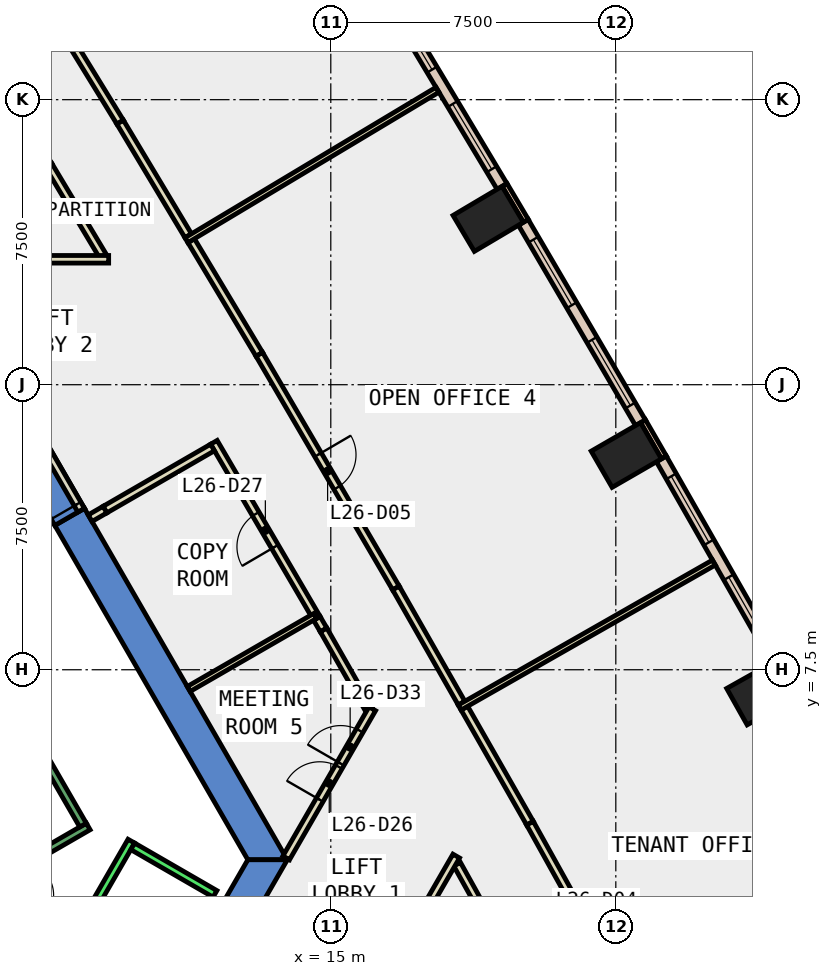
"""IFC4 building model, lengths in metres.
Left out: names, types, materials, properties, quantities, classifications, styles, units other than length and angle.
Written with IfcOpenShell. Run it as: python <this file> out.ifc"""

import sys

from ifc_helpers import new_model, si_unit, direction, frame, frame_2d, origin, origin_2d, place, context, subcontext, project, spatial, polyline, rectangle, outline, extrude, element, fill, save


model = new_model("IFC4")
c1 = context("Model", 3, precision=1e-05, world=origin(), true_north=direction((0.0, 1.0)))
c2 = subcontext(c1, "Body", "Model", "MODEL_VIEW")
j1 = project(units=[si_unit("LENGTHUNIT", "METRE"), si_unit("PLANEANGLEUNIT", "RADIAN")], contexts=[c1])
p1 = place(None, origin())
s1 = spatial("IfcSite", under=j1, at=p1, CompositionType="ELEMENT")
p2 = place(p1, origin())
s2 = spatial("IfcBuilding", under=s1, at=p2, CompositionType="ELEMENT")
p3 = place(p2, frame((0.0, 0.0, 120.2)))
s3 = spatial("IfcBuildingStorey", under=s2, at=p3, CompositionType="ELEMENT", Elevation=120.2)
for number, where, z_axis, x_axis in (
    (1, (26.341, 6.896, -0.4), (0.0, 0.0, 1.0), (-0.49, 0.872, 0.0)),
    (2, (22.777, 13.15, -0.4), (0.0, 0.0, 1.0), (-0.5, 0.866, 0.0)),
    (3, (19.143, 19.364, -0.4), (0.0, 0.0, 1.0), (-0.51, 0.86, 0.0)),
):
    element("IfcColumn", number, at=place(p3, frame(where, z_axis=z_axis, x_axis=x_axis)), inside=s3, PredefinedType="COLUMN", context=c2, shape_type="SweptSolid", body=[
        extrude(rectangle(XDim=1.1, YDim=1.5, at=origin_2d()), origin(), (0.0, 0.0, 1.0), 4.2),
    ])
p4 = place(p3, frame((0.0, 0.0, -0.4)))
e4 = element("IfcWall", 4, at=p4, inside=s3, PredefinedType="SHEAR", context=c2, shape_type="SweptSolid", body=[
    extrude(outline(polyline([(8.517, 11.748), (7.738, 11.298), (12.817, 2.5), (13.856, 2.5), (8.517, 11.748)])), origin(), (0.0, 0.0, 1.0), 4.2),
])
p5 = place(p3, frame((0.0, 0.0, 3.6)))
e5 = element("IfcWall", 5, at=p5, inside=s3, PredefinedType="SHEAR", context=c2, shape_type="SweptSolid", body=[
    extrude(outline(polyline([(7.517, 13.48), (6.738, 13.03), (7.738, 11.298), (8.517, 11.748), (7.517, 13.48)])), origin(), (0.0, 0.0, 1.0), 0.2),
])
p6 = place(p3, frame((0.0, 0.0, -0.4)))
e6 = element("IfcWall", 6, at=p6, inside=s3, PredefinedType="SHEAR", context=c2, shape_type="SweptSolid", body=[
    extrude(outline(polyline([(11.888, 0.89), (12.667, 0.44), (13.856, 2.5), (12.817, 2.5), (11.888, 0.89)])), origin(), (0.0, 0.0, 1.0), 4.2),
])
p7 = place(p3, frame((23.766, 13.086, 0.0), z_axis=(0.0, 0.0, 1.0), x_axis=(-0.499837685251, 0.86611909597, 0.0)))
e7 = element("IfcWall", 7, at=p7, inside=s3, PredefinedType="STANDARD", context=c2, shape_type="SweptSolid", body=[
    extrude(rectangle(XDim=1.1, YDim=0.15, at=frame_2d((0.55, 0.0))), origin(), (0.0, 0.0, 1.0), 3.8),
])
p8 = place(p3, frame((20.133, 19.312, 0.0), z_axis=(0.0, 0.0, 1.0), x_axis=(-0.510082245696, 0.860125631885, 0.0)))
e8 = element("IfcWall", 8, at=p8, inside=s3, PredefinedType="STANDARD", context=c2, shape_type="SweptSolid", body=[
    extrude(rectangle(XDim=1.1, YDim=0.15, at=frame_2d((0.55, 0.0))), origin(), (0.0, 0.0, 1.0), 3.8),
])
p9 = place(p3, frame((26.723, 7.74, 0.0), z_axis=(0.0, 0.0, 1.0), x_axis=(-0.495114366991, 0.868827810098, 0.0)))
e9 = element("IfcWall", 9, at=p9, inside=s3, PredefinedType="STANDARD", context=c2, shape_type="SweptSolid", body=[
    extrude(rectangle(XDim=6.11, YDim=0.3, at=frame_2d((3.055, 0.0))), origin(), (0.0, 0.0, 1.0), 3.8),
])
p10 = place(p9, frame((0.527, 0.0, 0.9)))
e10 = element("IfcOpeningElement", 10, at=p10, cuts=e9, PredefinedType="OPENING", context=c2, shape_type="SweptSolid", body=[
    extrude(rectangle(XDim=2.0, YDim=2.6, at=frame_2d((1.0, 1.3))), frame((0.0, 0.16, 0.0), z_axis=(0.0, -1.0, 0.0), x_axis=(1.0, 0.0, 0.0)), (0.0, 0.0, 1.0), 0.32),
])
p11 = place(p9, frame((3.582, 0.0, 0.9)))
e11 = element("IfcOpeningElement", 11, at=p11, cuts=e9, PredefinedType="OPENING", context=c2, shape_type="SweptSolid", body=[
    extrude(rectangle(XDim=2.0, YDim=2.6, at=frame_2d((1.0, 1.3))), frame((0.0, 0.16, 0.0), z_axis=(0.0, -1.0, 0.0), x_axis=(1.0, 0.0, 0.0)), (0.0, 0.0, 1.0), 0.32),
])
p12 = place(p3, frame((23.149, 13.999, 0.0), z_axis=(0.0, 0.0, 1.0), x_axis=(-0.504790055126, 0.863242144619, 0.0)))
e12 = element("IfcWall", 12, at=p12, inside=s3, PredefinedType="STANDARD", context=c2, shape_type="SweptSolid", body=[
    extrude(rectangle(XDim=6.109, YDim=0.3, at=frame_2d((3.055, 0.0))), origin(), (0.0, 0.0, 1.0), 3.8),
])
p13 = place(p12, frame((0.527, 0.0, 0.9)))
e13 = element("IfcOpeningElement", 13, at=p13, cuts=e12, PredefinedType="OPENING", context=c2, shape_type="SweptSolid", body=[
    extrude(rectangle(XDim=2.0, YDim=2.6, at=frame_2d((1.0, 1.3))), frame((0.0, 0.16, 0.0), z_axis=(0.0, -1.0, 0.0), x_axis=(1.0, 0.0, 0.0)), (0.0, 0.0, 1.0), 0.32),
])
p14 = place(p12, frame((3.582, 0.0, 0.9)))
e14 = element("IfcOpeningElement", 14, at=p14, cuts=e12, PredefinedType="OPENING", context=c2, shape_type="SweptSolid", body=[
    extrude(rectangle(XDim=2.0, YDim=2.6, at=frame_2d((1.0, 1.3))), frame((0.0, 0.16, 0.0), z_axis=(0.0, -1.0, 0.0), x_axis=(1.0, 0.0, 0.0)), (0.0, 0.0, 1.0), 0.32),
])
p15 = place(p3, frame((19.506, 20.217, 0.0), z_axis=(0.0, 0.0, 1.0), x_axis=(-0.514078503149, 0.857743139057, 0.0)))
e15 = element("IfcWall", 15, at=p15, inside=s3, PredefinedType="STANDARD", context=c2, shape_type="SweptSolid", body=[
    extrude(rectangle(XDim=6.11, YDim=0.3, at=frame_2d((3.055, 0.0))), origin(), (0.0, 0.0, 1.0), 3.8),
])
p16 = place(p15, frame((0.528, 0.0, 0.9)))
e16 = element("IfcOpeningElement", 16, at=p16, cuts=e15, PredefinedType="OPENING", context=c2, shape_type="SweptSolid", body=[
    extrude(rectangle(XDim=2.0, YDim=2.6, at=frame_2d((1.0, 1.3))), frame((0.0, 0.16, 0.0), z_axis=(0.0, -1.0, 0.0), x_axis=(1.0, 0.0, 0.0)), (0.0, 0.0, 1.0), 0.32),
])
p17 = place(p15, frame((3.583, 0.0, 0.9)))
e17 = element("IfcOpeningElement", 17, at=p17, cuts=e15, PredefinedType="OPENING", context=c2, shape_type="SweptSolid", body=[
    extrude(rectangle(XDim=2.0, YDim=2.6, at=frame_2d((1.0, 1.3))), frame((0.0, 0.16, 0.0), z_axis=(0.0, -1.0, 0.0), x_axis=(1.0, 0.0, 0.0)), (0.0, 0.0, 1.0), 0.32),
])
p18 = place(p3, frame((15.993, 6.473, 0.0), z_axis=(0.0, 0.0, 1.0), x_axis=(-0.495159881733, 0.86880187127, 0.0)))
e18 = element("IfcWall", 18, at=p18, inside=s3, PredefinedType="PARTITIONING", context=c2, shape_type="SweptSolid", body=[
    extrude(rectangle(XDim=2.391, YDim=0.2, at=frame_2d((1.195, 0.0))), origin(), (0.0, 0.0, 1.0), 3.8),
])
p19 = place(p3, frame((14.809, 8.55, 0.0), z_axis=(0.0, 0.0, 1.0), x_axis=(-0.50443330283, 0.86345066043, 0.0)))
e19 = element("IfcWall", 19, at=p19, inside=s3, PredefinedType="PARTITIONING", context=c2, shape_type="SweptSolid", body=[
    extrude(rectangle(XDim=0.351, YDim=0.2, at=frame_2d((0.175, 0.0))), origin(), (0.0, 0.0, 1.0), 3.8),
])
p20 = place(p3, frame((14.632, 8.853, 0.0), z_axis=(0.0, 0.0, 1.0), x_axis=(-0.504798859257, 0.863236996249, 0.0)))
e20 = element("IfcWall", 20, at=p20, inside=s3, PredefinedType="PARTITIONING", context=c2, shape_type="SweptSolid", body=[
    extrude(rectangle(XDim=5.365, YDim=0.2, at=frame_2d((2.682, 0.0))), origin(), (0.0, 0.0, 1.0), 3.8),
])
p21 = place(p20, frame((2.182, 0.0, 0.0)))
e21 = element("IfcOpeningElement", 21, at=p21, cuts=e20, PredefinedType="OPENING", context=c2, shape_type="SweptSolid", body=[
    extrude(rectangle(XDim=1.0, YDim=2.1, at=frame_2d((0.5, 1.05))), frame((0.0, 0.11, 0.0), z_axis=(0.0, -1.0, 0.0), x_axis=(1.0, 0.0, 0.0)), (0.0, 0.0, 1.0), 0.22),
])
p22 = place(p3, frame((11.888, 13.348, 0.0), z_axis=(0.0, 0.0, 1.0), x_axis=(-0.865959227195, -0.500114603702, 0.0)))
e22 = element("IfcWall", 22, at=p22, inside=s3, PredefinedType="PARTITIONING", context=c2, shape_type="SweptSolid", body=[
    extrude(rectangle(XDim=3.269, YDim=0.2, at=frame_2d((1.635, 0.0))), origin(), (0.0, 0.0, 1.0), 3.8),
])
p23 = place(p3, frame((9.003, 18.386, 0.0), z_axis=(0.0, 0.0, 1.0), x_axis=(-0.513900868925, 0.857849577092, 0.0)))
e23 = element("IfcWall", 23, at=p23, inside=s3, PredefinedType="PARTITIONING", context=c2, shape_type="SweptSolid", body=[
    extrude(rectangle(XDim=2.777, YDim=0.2, at=frame_2d((1.388, 0.0))), origin(), (0.0, 0.0, 1.0), 3.8),
])
p24 = place(p3, frame((21.773, -3.822, 0.0), z_axis=(0.0, 0.0, 1.0), x_axis=(-0.485826874234, 0.874055060206, 0.0)))
e24 = element("IfcWall", 24, at=p24, inside=s3, PredefinedType="PARTITIONING", context=c2, shape_type="SweptSolid", body=[
    extrude(rectangle(XDim=7.099, YDim=0.2, at=frame_2d((3.55, 0.0))), origin(), (0.0, 0.0, 1.0), 3.8),
])
p25 = place(p3, frame((18.515, 6.491, 0.0), z_axis=(0.0, 0.0, 1.0), x_axis=(0.495309264725, -0.868716715781, 0.0)))
e25 = element("IfcWall", 25, at=p25, inside=s3, PredefinedType="PARTITIONING", context=c2, shape_type="SweptSolid", body=[
    extrude(rectangle(XDim=3.487, YDim=0.2, at=frame_2d((1.743, 0.0))), origin(), (0.0, 0.0, 1.0), 3.8),
])
p26 = place(p3, frame((20.242, 3.462, 0.0), z_axis=(0.0, 0.0, 1.0), x_axis=(0.485742937917, -0.874101709336, 0.0)))
e26 = element("IfcWall", 26, at=p26, inside=s3, PredefinedType="PARTITIONING", context=c2, shape_type="SweptSolid", body=[
    extrude(rectangle(XDim=7.047, YDim=0.2, at=frame_2d((3.523, 0.0))), origin(), (0.0, 0.0, 1.0), 3.8),
])
p27 = place(p26, frame((3.099, 0.0, 0.0)))
e27 = element("IfcOpeningElement", 27, at=p27, cuts=e26, PredefinedType="OPENING", context=c2, shape_type="SweptSolid", body=[
    extrude(rectangle(XDim=1.0, YDim=2.1, at=frame_2d((0.5, 1.05))), frame((0.0, 0.11, 0.0), z_axis=(0.0, -1.0, 0.0), x_axis=(1.0, 0.0, 0.0)), (0.0, 0.0, 1.0), 0.22),
])
p28 = place(p3, frame((11.326, 18.79, 0.0), z_axis=(0.0, 0.0, 1.0), x_axis=(0.514155958966, -0.857696712049, 0.0)))
e28 = element("IfcWall", 28, at=p28, inside=s3, PredefinedType="PARTITIONING", context=c2, shape_type="SweptSolid", body=[
    extrude(rectangle(XDim=3.487, YDim=0.2, at=frame_2d((1.744, 0.0))), origin(), (0.0, 0.0, 1.0), 3.8),
])
p29 = place(p3, frame((13.119, 15.799, 0.0), z_axis=(0.0, 0.0, 1.0), x_axis=(0.504729598075, -0.863277494684, 0.0)))
e29 = element("IfcWall", 29, at=p29, inside=s3, PredefinedType="PARTITIONING", context=c2, shape_type="SweptSolid", body=[
    extrude(rectangle(XDim=7.123, YDim=0.2, at=frame_2d((3.562, 0.0))), origin(), (0.0, 0.0, 1.0), 3.8),
])
p30 = place(p29, frame((3.061, 0.0, 0.0)))
e30 = element("IfcOpeningElement", 30, at=p30, cuts=e29, PredefinedType="OPENING", context=c2, shape_type="SweptSolid", body=[
    extrude(rectangle(XDim=1.0, YDim=2.1, at=frame_2d((0.5, 1.05))), frame((0.0, 0.11, 0.0), z_axis=(0.0, -1.0, 0.0), x_axis=(1.0, 0.0, 0.0)), (0.0, 0.0, 1.0), 0.22),
])
p31 = place(p3, frame((16.714, 9.65, 0.0), z_axis=(0.0, 0.0, 1.0), x_axis=(0.495286549488, -0.868729666753, 0.0)))
e31 = element("IfcWall", 31, at=p31, inside=s3, PredefinedType="PARTITIONING", context=c2, shape_type="SweptSolid", body=[
    extrude(rectangle(XDim=3.487, YDim=0.2, at=frame_2d((1.743, 0.0))), origin(), (0.0, 0.0, 1.0), 3.8),
])
p32 = place(p3, frame((5.69, 28.042, 0.0), z_axis=(0.0, 0.0, 1.0), x_axis=(0.523381868706, -0.852098245222, 0.0)))
e32 = element("IfcWall", 32, at=p32, inside=s3, PredefinedType="PARTITIONING", context=c2, shape_type="SweptSolid", body=[
    extrude(rectangle(XDim=7.198, YDim=0.2, at=frame_2d((3.599, 0.0))), origin(), (0.0, 0.0, 1.0), 3.8),
])
p33 = place(p32, frame((3.099, 0.0, 0.0)))
e33 = element("IfcOpeningElement", 33, at=p33, cuts=e32, PredefinedType="OPENING", context=c2, shape_type="SweptSolid", body=[
    extrude(rectangle(XDim=1.0, YDim=2.1, at=frame_2d((0.5, 1.05))), frame((0.0, 0.11, 0.0), z_axis=(0.0, -1.0, 0.0), x_axis=(1.0, 0.0, 0.0)), (0.0, 0.0, 1.0), 0.22),
])
p34 = place(p3, frame((9.457, 21.909, 0.0), z_axis=(0.0, 0.0, 1.0), x_axis=(0.513949903813, -0.857820200491, 0.0)))
e34 = element("IfcWall", 34, at=p34, inside=s3, PredefinedType="PARTITIONING", context=c2, shape_type="SweptSolid", body=[
    extrude(rectangle(XDim=3.487, YDim=0.2, at=frame_2d((1.743, 0.0))), origin(), (0.0, 0.0, 1.0), 3.8),
])
p35 = place(p3, frame((6.25, 1.894, 0.0), z_axis=(0.0, 0.0, 1.0), x_axis=(0.866043184279, -0.499969202016, 0.0)))
e35 = element("IfcWall", 35, at=p35, inside=s3, PredefinedType="PARTITIONING", context=c2, shape_type="SweptSolid", body=[
    extrude(rectangle(XDim=2.084, YDim=0.2, at=frame_2d((1.042, 0.0))), origin(), (0.0, 0.0, 1.0), 3.8),
])
p36 = place(p35, frame((0.642, 0.0, 0.0)))
e36 = element("IfcOpeningElement", 36, at=p36, cuts=e35, PredefinedType="OPENING", context=c2, shape_type="SweptSolid", body=[
    extrude(rectangle(XDim=0.9, YDim=2.1, at=frame_2d((0.45, 1.05))), frame((0.0, 0.11, 0.0), z_axis=(0.0, -1.0, 0.0), x_axis=(1.0, 0.0, 0.0)), (0.0, 0.0, 1.0), 0.22),
])
p37 = place(p3, frame((11.261, 6.994, 0.0), z_axis=(0.0, 0.0, 1.0), x_axis=(0.86605248387, 0.499953092981, 0.0)))
e37 = element("IfcWall", 37, at=p37, inside=s3, PredefinedType="PARTITIONING", context=c2, shape_type="SweptSolid", body=[
    extrude(rectangle(XDim=3.848, YDim=0.15, at=frame_2d((1.924, 0.0))), origin(), (0.0, 0.0, 1.0), 3.8),
])
p38 = place(p3, frame((13.827, 2.55, 0.0), z_axis=(0.0, 0.0, 1.0), x_axis=(0.500045913515, 0.865998893981, 0.0)))
e38 = element("IfcWall", 38, at=p38, inside=s3, PredefinedType="PARTITIONING", context=c2, shape_type="SweptSolid", body=[
    extrude(rectangle(XDim=4.53, YDim=0.2, at=frame_2d((2.265, 0.0))), origin(), (0.0, 0.0, 1.0), 3.8),
])
p39 = place(p38, frame((1.765, 0.0, 0.0)))
e39 = element("IfcOpeningElement", 39, at=p39, cuts=e38, PredefinedType="OPENING", context=c2, shape_type="SweptSolid", body=[
    extrude(rectangle(XDim=1.0, YDim=2.1, at=frame_2d((0.5, 1.05))), frame((0.0, 0.11, 0.0), z_axis=(0.0, -1.0, 0.0), x_axis=(1.0, 0.0, 0.0)), (0.0, 0.0, 1.0), 0.22),
])
p40 = place(p38, frame((2.865, 0.0, 0.0)))
e40 = element("IfcOpeningElement", 40, at=p40, cuts=e38, PredefinedType="OPENING", context=c2, shape_type="SweptSolid", body=[
    extrude(rectangle(XDim=1.0, YDim=2.1, at=frame_2d((0.5, 1.05))), frame((0.0, 0.11, 0.0), z_axis=(0.0, -1.0, 0.0), x_axis=(1.0, 0.0, 0.0)), (0.0, 0.0, 1.0), 0.22),
])
p41 = place(p3, frame((0.4, 18.3, 0.0), z_axis=(0.0, 0.0, 1.0), x_axis=(1.0, 0.0, 0.0)))
e41 = element("IfcWall", 41, at=p41, inside=s3, PredefinedType="PARTITIONING", context=c2, shape_type="SweptSolid", body=[
    extrude(rectangle(XDim=8.755, YDim=0.2, at=frame_2d((4.377, 0.0))), origin(), (0.0, 0.0, 1.0), 3.8),
])
p42 = place(p3, frame((18.301, 2.598, 0.0), z_axis=(0.0, 0.0, 1.0), x_axis=(-0.49997732567, -0.866038494419, 0.0)))
e42 = element("IfcWall", 42, at=p42, inside=s3, PredefinedType="PARTITIONING", context=c2, shape_type="SweptSolid", body=[
    extrude(rectangle(XDim=11.0, YDim=0.2, at=frame_2d((5.5, 0.0))), origin(), (0.0, 0.0, 1.0), 3.8),
])
p43 = place(p3, frame((18.391, 6.506, 0.0), z_axis=(0.0, 0.0, 1.0), x_axis=(0.868738258528, 0.495271479261, 0.0)))
e43 = element("IfcWall", 43, at=p43, inside=s3, PredefinedType="PARTITIONING", context=c2, shape_type="SweptSolid", body=[
    extrude(rectangle(XDim=7.701, YDim=0.15, at=frame_2d((3.85, 0.0))), origin(), (0.0, 0.0, 1.0), 3.8),
])
p44 = place(p3, frame((11.202, 18.803, 0.0), z_axis=(0.0, 0.0, 1.0), x_axis=(0.857778149162, 0.514020084062, 0.0)))
e44 = element("IfcWall", 44, at=p44, inside=s3, PredefinedType="PARTITIONING", context=c2, shape_type="SweptSolid", body=[
    extrude(rectangle(XDim=7.7, YDim=0.15, at=frame_2d((3.85, 0.0))), origin(), (0.0, 0.0, 1.0), 3.8),
])
p45 = place(p3, frame((8.43, 11.698, 0.0), z_axis=(0.0, 0.0, 1.0), x_axis=(-0.50002537861, 0.866010750942, 0.0)))
e45 = element("IfcWall", 45, at=p45, inside=s3, PredefinedType="PARTITIONING", context=c2, shape_type="SweptSolid", body=[
    extrude(rectangle(XDim=2.0, YDim=0.2, at=frame_2d((1.0, 0.0))), origin(), (0.0, 0.0, 1.0), 2.4),
])
p46 = place(p45, frame((0.19, 0.0, 0.0)))
e46 = element("IfcOpeningElement", 46, at=p46, cuts=e45, PredefinedType="OPENING", context=c2, shape_type="SweptSolid", body=[
    extrude(rectangle(XDim=1.8, YDim=2.1, at=frame_2d((0.9, 1.05))), frame((0.0, 0.11, 0.0), z_axis=(0.0, -1.0, 0.0), x_axis=(1.0, 0.0, 0.0)), (0.0, 0.0, 1.0), 0.22),
])
p47 = place(p3, frame((9.057, 11.713, 0.0), z_axis=(0.0, 0.0, 1.0), x_axis=(-0.866266849364, -0.49958157061, 0.0)))
e47 = element("IfcWall", 47, at=p47, inside=s3, PredefinedType="PARTITIONING", context=c2, shape_type="SweptSolid", body=[
    extrude(rectangle(XDim=0.45, YDim=0.2, at=frame_2d((0.225, 0.0))), origin(), (0.0, 0.0, 1.0), 2.4),
])
p48 = place(p3, frame((4.451, -6.19, 0.0), z_axis=(0.0, 0.0, 1.0), x_axis=(0.50000090737, 0.866024879913, 0.0)))
e48 = element("IfcWall", 48, at=p48, inside=s3, PredefinedType="STANDARD", context=c2, shape_type="SweptSolid", body=[
    extrude(rectangle(XDim=10.6, YDim=0.2, at=frame_2d((5.3, 0.0))), origin(), (0.0, 0.0, 1.0), 3.8),
])
p49 = place(p3, frame((9.788, 2.853, 0.0), z_axis=(0.0, 0.0, 1.0), x_axis=(0.865998541277, -0.500046524342, 0.0)))
e49 = element("IfcWall", 49, at=p49, inside=s3, PredefinedType="STANDARD", context=c2, shape_type="SweptSolid", body=[
    extrude(rectangle(XDim=2.5, YDim=0.2, at=frame_2d((1.25, 0.0))), origin(), (0.0, 0.0, 1.0), 3.8),
])
p50 = place(p3, frame((4.806, 1.176, 0.0), z_axis=(0.0, 0.0, 1.0), x_axis=(0.866059941101, 0.499940174841, 0.0)))
e50 = element("IfcWall", 50, at=p50, inside=s3, PredefinedType="STANDARD", context=c2, shape_type="SweptSolid", body=[
    extrude(rectangle(XDim=4.4, YDim=0.2, at=frame_2d((2.2, 0.0))), origin(), (0.0, 0.0, 1.0), 3.8),
])
p51 = place(p50, frame((1.65, 0.0, 0.0)))
e51 = element("IfcOpeningElement", 51, at=p51, cuts=e50, PredefinedType="OPENING", context=c2, shape_type="SweptSolid", body=[
    extrude(rectangle(XDim=1.1, YDim=2.2, at=frame_2d((0.55, 1.1))), frame((0.0, 0.11, 0.0), z_axis=(0.0, -1.0, 0.0), x_axis=(1.0, 0.0, 0.0)), (0.0, 0.0, 1.0), 0.22),
])
p52 = place(p3, frame((8.48, 3.412, 0.0), z_axis=(0.0, 0.0, 1.0), x_axis=(-0.499978703459, 0.866037698999, 0.0)))
e52 = element("IfcWall", 52, at=p52, inside=s3, PredefinedType="STANDARD", context=c2, shape_type="SweptSolid", body=[
    extrude(rectangle(XDim=6.9, YDim=0.2, at=frame_2d((3.45, 0.0))), origin(), (0.0, 0.0, 1.0), 3.8),
])
p53 = place(p10, origin())
e53 = element("IfcWindow", 53, at=p53, inside=s3, PartitioningType="SINGLE_PANEL", PredefinedType="WINDOW", context=c2, shape_type="SweptSolid", body=[
    extrude(rectangle(XDim=2.0, YDim=2.6, at=frame_2d((1.0, 1.3))), frame((0.0, 0.03, 0.0), z_axis=(0.0, -1.0, 0.0), x_axis=(1.0, 0.0, 0.0)), (0.0, 0.0, 1.0), 0.06),
])
fill(e10, e53)
p54 = place(p11, origin())
e54 = element("IfcWindow", 54, at=p54, inside=s3, PartitioningType="SINGLE_PANEL", PredefinedType="WINDOW", context=c2, shape_type="SweptSolid", body=[
    extrude(rectangle(XDim=2.0, YDim=2.6, at=frame_2d((1.0, 1.3))), frame((0.0, 0.03, 0.0), z_axis=(0.0, -1.0, 0.0), x_axis=(1.0, 0.0, 0.0)), (0.0, 0.0, 1.0), 0.06),
])
fill(e11, e54)
p55 = place(p13, origin())
e55 = element("IfcWindow", 55, at=p55, inside=s3, PartitioningType="SINGLE_PANEL", PredefinedType="WINDOW", context=c2, shape_type="SweptSolid", body=[
    extrude(rectangle(XDim=2.0, YDim=2.6, at=frame_2d((1.0, 1.3))), frame((0.0, 0.03, 0.0), z_axis=(0.0, -1.0, 0.0), x_axis=(1.0, 0.0, 0.0)), (0.0, 0.0, 1.0), 0.06),
])
fill(e13, e55)
p56 = place(p14, origin())
e56 = element("IfcWindow", 56, at=p56, inside=s3, PartitioningType="SINGLE_PANEL", PredefinedType="WINDOW", context=c2, shape_type="SweptSolid", body=[
    extrude(rectangle(XDim=2.0, YDim=2.6, at=frame_2d((1.0, 1.3))), frame((0.0, 0.03, 0.0), z_axis=(0.0, -1.0, 0.0), x_axis=(1.0, 0.0, 0.0)), (0.0, 0.0, 1.0), 0.06),
])
fill(e14, e56)
p57 = place(p16, origin())
e57 = element("IfcWindow", 57, at=p57, inside=s3, PartitioningType="SINGLE_PANEL", PredefinedType="WINDOW", context=c2, shape_type="SweptSolid", body=[
    extrude(rectangle(XDim=2.0, YDim=2.6, at=frame_2d((1.0, 1.3))), frame((0.0, 0.03, 0.0), z_axis=(0.0, -1.0, 0.0), x_axis=(1.0, 0.0, 0.0)), (0.0, 0.0, 1.0), 0.06),
])
fill(e16, e57)
p58 = place(p17, origin())
e58 = element("IfcWindow", 58, at=p58, inside=s3, PartitioningType="SINGLE_PANEL", PredefinedType="WINDOW", context=c2, shape_type="SweptSolid", body=[
    extrude(rectangle(XDim=2.0, YDim=2.6, at=frame_2d((1.0, 1.3))), frame((0.0, 0.03, 0.0), z_axis=(0.0, -1.0, 0.0), x_axis=(1.0, 0.0, 0.0)), (0.0, 0.0, 1.0), 0.06),
])
fill(e17, e58)
p59 = place(p30, origin())
e59 = element("IfcDoor", 59, at=p59, inside=s3, OperationType="SINGLE_SWING_RIGHT", PredefinedType="DOOR", context=c2, shape_type="SweptSolid", body=[
    extrude(rectangle(XDim=1.0, YDim=2.1, at=frame_2d((0.5, 1.05))), frame((0.0, 0.025, 0.0), z_axis=(0.0, -1.0, 0.0), x_axis=(1.0, 0.0, 0.0)), (0.0, 0.0, 1.0), 0.05),
])
fill(e30, e59)
p60 = place(p39, origin())
e60 = element("IfcDoor", 60, at=p60, inside=s3, OperationType="SINGLE_SWING_LEFT", PredefinedType="DOOR", context=c2, shape_type="SweptSolid", body=[
    extrude(rectangle(XDim=1.0, YDim=2.1, at=frame_2d((0.5, 1.05))), frame((0.0, 0.025, 0.0), z_axis=(0.0, -1.0, 0.0), x_axis=(1.0, 0.0, 0.0)), (0.0, 0.0, 1.0), 0.05),
])
fill(e39, e60)
p61 = place(p21, origin())
e61 = element("IfcDoor", 61, at=p61, inside=s3, OperationType="SINGLE_SWING_LEFT", PredefinedType="DOOR", context=c2, shape_type="SweptSolid", body=[
    extrude(rectangle(XDim=1.0, YDim=2.1, at=frame_2d((0.5, 1.05))), frame((0.0, 0.025, 0.0), z_axis=(0.0, -1.0, 0.0), x_axis=(1.0, 0.0, 0.0)), (0.0, 0.0, 1.0), 0.05),
])
fill(e21, e61)
p62 = place(p40, origin())
e62 = element("IfcDoor", 62, at=p62, inside=s3, OperationType="SINGLE_SWING_RIGHT", PredefinedType="DOOR", context=c2, shape_type="SweptSolid", body=[
    extrude(rectangle(XDim=1.0, YDim=2.1, at=frame_2d((0.5, 1.05))), frame((0.0, 0.025, 0.0), z_axis=(0.0, -1.0, 0.0), x_axis=(1.0, 0.0, 0.0)), (0.0, 0.0, 1.0), 0.05),
])
fill(e40, e62)
p63 = place(p46, origin())
e63 = element("IfcDoor", 63, at=p63, inside=s3, OperationType="DOUBLE_DOOR_SINGLE_SWING", PredefinedType="DOOR", context=c2, shape_type="SweptSolid", body=[
    extrude(rectangle(XDim=1.8, YDim=2.1, at=frame_2d((0.9, 1.05))), frame((0.0, 0.025, 0.0), z_axis=(0.0, -1.0, 0.0), x_axis=(1.0, 0.0, 0.0)), (0.0, 0.0, 1.0), 0.05),
])
fill(e46, e63)
save(model, sys.argv[1])
